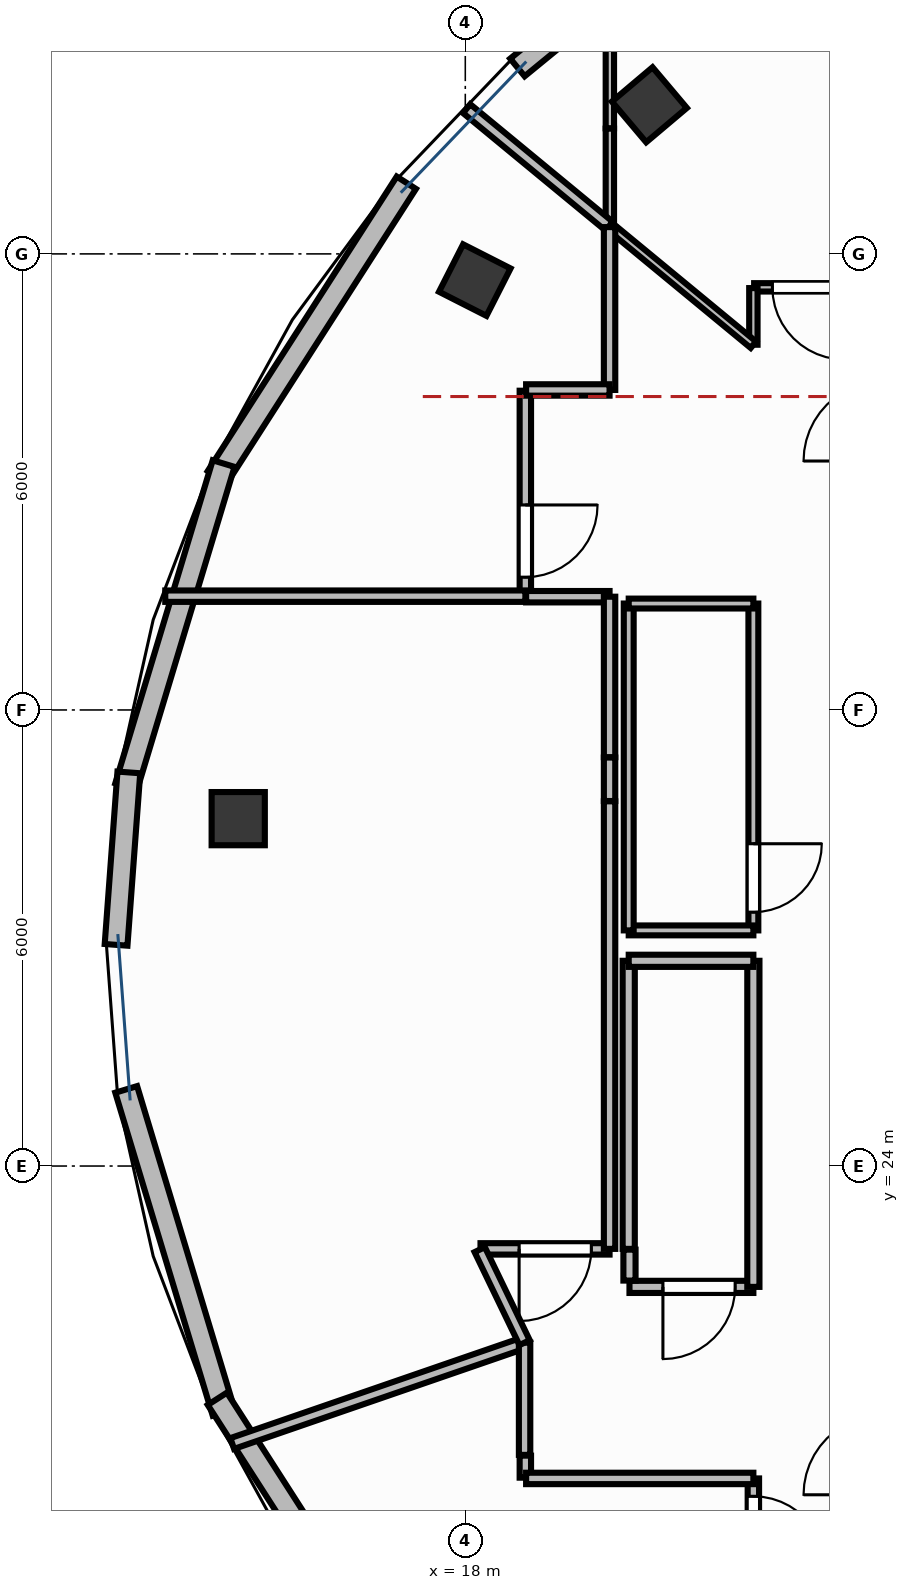
"""IFC4 building model, lengths in metres.
Left out: names, types, materials, properties, quantities, classifications, styles, units other than length and angle.
Written with IfcOpenShell. Run it as: python <this file> out.ifc"""

import sys

from ifc_helpers import new_model, si_unit, direction, frame, frame_2d, origin, origin_2d, place, context, subcontext, project, spatial, rectangle, extrude, element, fill, save


model = new_model("IFC4")
c1 = context("Model", 3, precision=1e-05, world=origin(), true_north=direction((0.0, 1.0)))
c2 = subcontext(c1, "Body", "Model", "MODEL_VIEW")
j1 = project(units=[si_unit("LENGTHUNIT", "METRE"), si_unit("PLANEANGLEUNIT", "RADIAN")], contexts=[c1])
p1 = place(None, origin())
s1 = spatial("IfcSite", under=j1, at=p1, CompositionType="ELEMENT")
p2 = place(p1, origin())
s2 = spatial("IfcBuilding", under=s1, at=p2, CompositionType="ELEMENT")
p3 = place(p2, frame((0.0, 0.0, 322.8)))
s3 = spatial("IfcBuildingStorey", under=s2, at=p3, CompositionType="ELEMENT", Elevation=322.8)
for number, where, z_axis, x_axis in (
    (1, (20.422, 37.962, -0.0), (0.0, 0.0, 1.0), (0.764, 0.645, 0.0)),
    (2, (18.125, 35.655, -0.0), (0.0, 0.0, 1.0), (0.453, 0.891, 0.0)),
    (3, (15.013, 28.57, -0.0), (0.0, 0.0, 1.0), (0.0, 1.0, 0.0)),
):
    element("IfcColumn", number, at=place(p3, frame(where, z_axis=z_axis, x_axis=x_axis)), inside=s3, PredefinedType="COLUMN", context=c2, shape_type="SweptSolid", body=[
        extrude(rectangle(XDim=0.7, YDim=0.7, at=origin_2d()), origin(), (0.0, 0.0, 1.0), 3.901),
    ])
p4 = place(p3, frame((20.64, 40.054, 0.0), z_axis=(0.0, 0.0, 1.0), x_axis=(-0.77351792086, -0.633774428411, 0.0)))
e4 = element("IfcWall", 4, at=p4, inside=s3, PredefinedType="STANDARD", context=c2, shape_type="SweptSolid", body=[
    extrude(rectangle(XDim=2.526, YDim=0.3, at=frame_2d((1.263, 0.0))), origin(), (0.0, 0.0, 1.0), 3.9),
])
p5 = place(p3, frame((17.224, 36.936, 0.0), z_axis=(0.0, 0.0, 1.0), x_axis=(-0.540087262842, -0.841609023547, 0.0)))
e5 = element("IfcWall", 5, at=p5, inside=s3, PredefinedType="STANDARD", context=c2, shape_type="SweptSolid", body=[
    extrude(rectangle(XDim=4.603, YDim=0.3, at=frame_2d((2.302, 0.0))), origin(), (0.0, 0.0, 1.0), 3.9),
])
p6 = place(p3, frame((14.821, 33.241, 0.0), z_axis=(0.0, 0.0, 1.0), x_axis=(-0.288720187326, -0.95741352269, 0.0)))
e6 = element("IfcWall", 6, at=p6, inside=s3, PredefinedType="STANDARD", context=c2, shape_type="SweptSolid", body=[
    extrude(rectangle(XDim=4.438, YDim=0.3, at=frame_2d((2.219, 0.0))), origin(), (0.0, 0.0, 1.0), 3.9),
])
p7 = place(p3, frame((13.573, 29.178, 0.0), z_axis=(0.0, 0.0, 1.0), x_axis=(-0.073741209899, -0.997277410735, 0.0)))
e7 = element("IfcWall", 7, at=p7, inside=s3, PredefinedType="STANDARD", context=c2, shape_type="SweptSolid", body=[
    extrude(rectangle(XDim=2.274, YDim=0.3, at=frame_2d((1.137, 0.0))), origin(), (0.0, 0.0, 1.0), 3.9),
])
p8 = place(p3, frame((13.539, 25.008, 0.0), z_axis=(0.0, 0.0, 1.0), x_axis=(0.288720187326, -0.95741352269, 0.0)))
e8 = element("IfcWall", 8, at=p8, inside=s3, PredefinedType="STANDARD", context=c2, shape_type="SweptSolid", body=[
    extrude(rectangle(XDim=4.438, YDim=0.3, at=frame_2d((2.219, 0.0))), origin(), (0.0, 0.0, 1.0), 3.9),
])
p9 = place(p3, frame((14.738, 20.938, 0.0), z_axis=(0.0, 0.0, 1.0), x_axis=(0.540087262842, -0.841609023547, 0.0)))
e9 = element("IfcWall", 9, at=p9, inside=s3, PredefinedType="STANDARD", context=c2, shape_type="SweptSolid", body=[
    extrude(rectangle(XDim=4.603, YDim=0.3, at=frame_2d((2.302, 0.0))), origin(), (0.0, 0.0, 1.0), 3.9),
])
p10 = place(p3, frame((21.79, 22.41, 0.0), z_axis=(0.0, 0.0, 1.0), x_axis=(-1.0, 0.0, 0.0)))
e10 = element("IfcWall", 10, at=p10, inside=s3, PredefinedType="PARTITIONING", context=c2, shape_type="SweptSolid", body=[
    extrude(rectangle(XDim=1.63, YDim=0.16, at=frame_2d((0.815, 0.0))), origin(), (0.0, 0.0, 1.0), 2.22),
])
p11 = place(p10, frame((0.24, 0.0, 0.0)))
e11 = element("IfcOpeningElement", 11, at=p11, cuts=e10, PredefinedType="OPENING", context=c2, shape_type="SweptSolid", body=[
    extrude(rectangle(XDim=0.95, YDim=2.15, at=frame_2d((0.475, 1.075))), frame((0.0, 0.095, 0.0), z_axis=(0.0, -1.0, 0.0), x_axis=(1.0, 0.0, 0.0)), (0.0, 0.0, 1.0), 0.19),
])
p12 = place(p3, frame((21.79, 31.4, 0.0), z_axis=(0.0, 0.0, 1.0), x_axis=(0.0, -1.0, 0.0)))
e12 = element("IfcWall", 12, at=p12, inside=s3, PredefinedType="PARTITIONING", context=c2, shape_type="SweptSolid", body=[
    extrude(rectangle(XDim=4.3, YDim=0.13, at=frame_2d((2.15, 0.0))), origin(), (0.0, 0.0, 1.0), 2.22),
])
p13 = place(p12, frame((3.16, 0.0, 0.0)))
e13 = element("IfcOpeningElement", 13, at=p13, cuts=e12, PredefinedType="OPENING", context=c2, shape_type="SweptSolid", body=[
    extrude(rectangle(XDim=0.9, YDim=2.15, at=frame_2d((0.45, 1.075))), frame((0.0, 0.08, 0.0), z_axis=(0.0, -1.0, 0.0), x_axis=(1.0, 0.0, 0.0)), (0.0, 0.0, 1.0), 0.16),
])
p14 = place(p3, frame((21.79, 19.89, 0.0), z_axis=(0.0, 0.0, 1.0), x_axis=(0.0, -1.0, 0.0)))
e14 = element("IfcWall", 14, at=p14, inside=s3, PredefinedType="PARTITIONING", context=c2, shape_type="SweptSolid", body=[
    extrude(rectangle(XDim=1.44, YDim=0.15, at=frame_2d((0.72, 0.0))), origin(), (0.0, 0.0, 1.0), 2.22),
])
p15 = place(p14, frame((0.235, 0.0, 0.0)))
e15 = element("IfcOpeningElement", 15, at=p15, cuts=e14, PredefinedType="OPENING", context=c2, shape_type="SweptSolid", body=[
    extrude(rectangle(XDim=0.95, YDim=2.15, at=frame_2d((0.475, 1.075))), frame((0.0, 0.09, 0.0), z_axis=(0.0, -1.0, 0.0), x_axis=(1.0, 0.0, 0.0)), (0.0, 0.0, 1.0), 0.18),
])
p16 = place(p3, frame((23.49, 35.56, 0.0), z_axis=(0.0, 0.0, 1.0), x_axis=(-1.0, 0.0, 0.0)))
e16 = element("IfcWall", 16, at=p16, inside=s3, PredefinedType="MOVABLE", context=c2, shape_type="SweptSolid", body=[
    extrude(rectangle(XDim=1.69, YDim=0.11, at=frame_2d((0.845, 0.0))), origin(), (0.0, 0.0, 1.0), 2.22),
])
p17 = place(p16, frame((0.5, 0.0, 0.0)))
e17 = element("IfcOpeningElement", 17, at=p17, cuts=e16, PredefinedType="OPENING", context=c2, shape_type="SweptSolid", body=[
    extrude(rectangle(XDim=0.95, YDim=2.15, at=frame_2d((0.475, 1.075))), frame((0.0, 0.07, 0.0), z_axis=(0.0, -1.0, 0.0), x_axis=(1.0, 0.0, 0.0)), (0.0, 0.0, 1.0), 0.14),
])
p18 = place(p3, frame((19.898, 22.91, 0.0), z_axis=(0.0, 0.0, 1.0), x_axis=(-1.0, 0.0, 0.0)))
e18 = element("IfcWall", 18, at=p18, inside=s3, PredefinedType="PARTITIONING", context=c2, shape_type="SweptSolid", body=[
    extrude(rectangle(XDim=1.698, YDim=0.15, at=frame_2d((0.849, 0.0))), origin(), (0.0, 0.0, 1.0), 2.22),
])
p19 = place(p18, frame((0.24, 0.0, 0.0)))
e19 = element("IfcOpeningElement", 19, at=p19, cuts=e18, PredefinedType="OPENING", context=c2, shape_type="SweptSolid", body=[
    extrude(rectangle(XDim=0.95, YDim=2.15, at=frame_2d((0.475, 1.075))), frame((0.0, 0.09, 0.0), z_axis=(0.0, -1.0, 0.0), x_axis=(1.0, 0.0, 0.0)), (0.0, 0.0, 1.0), 0.18),
])
p20 = place(p3, frame((18.79, 34.2, 0.0), z_axis=(0.0, 0.0, 1.0), x_axis=(0.0, -1.0, 0.0)))
e20 = element("IfcWall", 20, at=p20, inside=s3, PredefinedType="PARTITIONING", context=c2, shape_type="SweptSolid", body=[
    extrude(rectangle(XDim=2.693, YDim=0.15, at=frame_2d((1.346, 0.0))), origin(), (0.0, 0.0, 1.0), 2.22),
])
p21 = place(p20, frame((1.503, 0.0, 0.0)))
e21 = element("IfcOpeningElement", 21, at=p21, cuts=e20, PredefinedType="OPENING", context=c2, shape_type="SweptSolid", body=[
    extrude(rectangle(XDim=0.95, YDim=2.15, at=frame_2d((0.475, 1.075))), frame((0.0, 0.09, 0.0), z_axis=(0.0, -1.0, 0.0), x_axis=(1.0, 0.0, 0.0)), (0.0, 0.0, 1.0), 0.18),
])
p22 = place(p3, frame((21.79, 26.7, 0.0), z_axis=(0.0, 0.0, 1.0), x_axis=(0.0, -1.0, 0.0)))
e22 = element("IfcWall", 22, at=p22, inside=s3, PredefinedType="PARTITIONING", context=c2, shape_type="SweptSolid", body=[
    extrude(rectangle(XDim=4.29, YDim=0.16, at=frame_2d((2.145, 0.0))), origin(), (0.0, 0.0, 1.0), 2.22),
])
p23 = place(p3, frame((20.16, 22.493, 0.0), z_axis=(0.0, 0.0, 1.0), x_axis=(0.0, 1.0, 0.0)))
e23 = element("IfcWall", 23, at=p23, inside=s3, PredefinedType="PARTITIONING", context=c2, shape_type="SweptSolid", body=[
    extrude(rectangle(XDim=0.407, YDim=0.16, at=frame_2d((0.204, 0.0))), origin(), (0.0, 0.0, 1.0), 2.22),
])
p24 = place(p3, frame((20.15, 22.91, 0.0), z_axis=(0.0, 0.0, 1.0), x_axis=(0.0, 1.0, 0.0)))
e24 = element("IfcWall", 24, at=p24, inside=s3, PredefinedType="PARTITIONING", context=c2, shape_type="SweptSolid", body=[
    extrude(rectangle(XDim=3.79, YDim=0.16, at=frame_2d((1.895, 0.0))), origin(), (0.0, 0.0, 1.0), 2.22),
])
p25 = place(p3, frame((20.15, 26.7, 0.0), z_axis=(0.0, 0.0, 1.0), x_axis=(1.0, 0.0, 0.0)))
e25 = element("IfcWall", 25, at=p25, inside=s3, PredefinedType="PARTITIONING", context=c2, shape_type="SweptSolid", body=[
    extrude(rectangle(XDim=1.64, YDim=0.16, at=frame_2d((0.82, 0.0))), origin(), (0.0, 0.0, 1.0), 2.22),
])
p26 = place(p3, frame((21.79, 27.1, 0.0), z_axis=(0.0, 0.0, 1.0), x_axis=(-1.0, 0.0, 0.0)))
e26 = element("IfcWall", 26, at=p26, inside=s3, PredefinedType="PARTITIONING", context=c2, shape_type="SweptSolid", body=[
    extrude(rectangle(XDim=1.64, YDim=0.13, at=frame_2d((0.82, 0.0))), origin(), (0.0, 0.0, 1.0), 2.22),
])
p27 = place(p3, frame((20.15, 27.1, 0.0), z_axis=(0.0, 0.0, 1.0), x_axis=(0.0, 1.0, 0.0)))
e27 = element("IfcWall", 27, at=p27, inside=s3, PredefinedType="PARTITIONING", context=c2, shape_type="SweptSolid", body=[
    extrude(rectangle(XDim=4.3, YDim=0.13, at=frame_2d((2.15, 0.0))), origin(), (0.0, 0.0, 1.0), 2.22),
])
p28 = place(p3, frame((20.15, 31.4, 0.0), z_axis=(0.0, 0.0, 1.0), x_axis=(1.0, 0.0, 0.0)))
e28 = element("IfcWall", 28, at=p28, inside=s3, PredefinedType="PARTITIONING", context=c2, shape_type="SweptSolid", body=[
    extrude(rectangle(XDim=1.64, YDim=0.13, at=frame_2d((0.82, 0.0))), origin(), (0.0, 0.0, 1.0), 2.22),
])
p29 = place(p3, frame((14.934, 20.35, 0.0), z_axis=(0.0, 0.0, 1.0), x_axis=(0.945331527332, 0.326110875979, 0.0)))
e29 = element("IfcWall", 29, at=p29, inside=s3, PredefinedType="PARTITIONING", context=c2, shape_type="SweptSolid", body=[
    extrude(rectangle(XDim=4.069, YDim=0.15, at=frame_2d((2.034, 0.0))), origin(), (0.0, 0.0, 1.0), 2.22),
])
p30 = place(p3, frame((18.78, 21.677, 0.0), z_axis=(0.0, 0.0, 1.0), x_axis=(0.0, -1.0, 0.0)))
e30 = element("IfcWall", 30, at=p30, inside=s3, PredefinedType="PARTITIONING", context=c2, shape_type="SweptSolid", body=[
    extrude(rectangle(XDim=1.477, YDim=0.15, at=frame_2d((0.738, 0.0))), origin(), (0.0, 0.0, 1.0), 2.22),
])
p31 = place(p3, frame((18.79, 20.19, 0.0), z_axis=(0.0, 0.0, 1.0), x_axis=(0.0, -1.0, 0.0)))
e31 = element("IfcWall", 31, at=p31, inside=s3, PredefinedType="PARTITIONING", context=c2, shape_type="SweptSolid", body=[
    extrude(rectangle(XDim=0.29, YDim=0.15, at=frame_2d((0.145, 0.0))), origin(), (0.0, 0.0, 1.0), 2.22),
])
p32 = place(p3, frame((18.8, 19.89, 0.0), z_axis=(0.0, 0.0, 1.0), x_axis=(1.0, 0.0, 0.0)))
e32 = element("IfcWall", 32, at=p32, inside=s3, PredefinedType="PARTITIONING", context=c2, shape_type="SweptSolid", body=[
    extrude(rectangle(XDim=2.99, YDim=0.15, at=frame_2d((1.495, 0.0))), origin(), (0.0, 0.0, 1.0), 2.22),
])
p33 = place(p3, frame((19.902, 37.652, 0.0), z_axis=(0.0, 0.0, 1.0), x_axis=(0.0, 1.0, 0.0)))
e33 = element("IfcWall", 33, at=p33, inside=s3, PredefinedType="MOVABLE", context=c2, shape_type="SweptSolid", body=[
    extrude(rectangle(XDim=1.873, YDim=0.11, at=frame_2d((0.937, 0.0))), origin(), (0.0, 0.0, 1.0), 2.22),
])
p34 = place(p3, frame((21.79, 35.55, 0.0), z_axis=(0.0, 0.0, 1.0), x_axis=(0.0, -1.0, 0.0)))
e34 = element("IfcWall", 34, at=p34, inside=s3, PredefinedType="MOVABLE", context=c2, shape_type="SweptSolid", body=[
    extrude(rectangle(XDim=0.745, YDim=0.11, at=frame_2d((0.373, 0.0))), origin(), (0.0, 0.0, 1.0), 2.22),
])
p35 = place(p3, frame((21.79, 34.805, 0.0), z_axis=(0.0, 0.0, 1.0), x_axis=(-0.771457748332, 0.636280553325, 0.0)))
e35 = element("IfcWall", 35, at=p35, inside=s3, PredefinedType="MOVABLE", context=c2, shape_type="SweptSolid", body=[
    extrude(rectangle(XDim=2.447, YDim=0.11, at=frame_2d((1.224, 0.0))), origin(), (0.0, 0.0, 1.0), 2.22),
])
p36 = place(p3, frame((19.902, 36.362, 0.0), z_axis=(0.0, 0.0, 1.0), x_axis=(0.0, 1.0, 0.0)))
e36 = element("IfcWall", 36, at=p36, inside=s3, PredefinedType="MOVABLE", context=c2, shape_type="SweptSolid", body=[
    extrude(rectangle(XDim=1.285, YDim=0.11, at=frame_2d((0.643, 0.0))), origin(), (0.0, 0.0, 1.0), 2.22),
])
p37 = place(p3, frame((14.052, 31.497, 0.0), z_axis=(0.0, 0.0, 1.0), x_axis=(1.0, 0.0, 0.0)))
e37 = element("IfcWall", 37, at=p37, inside=s3, PredefinedType="PARTITIONING", context=c2, shape_type="SweptSolid", body=[
    extrude(rectangle(XDim=4.738, YDim=0.15, at=frame_2d((2.369, 0.0))), origin(), (0.0, 0.0, 1.0), 2.22),
])
p38 = place(p3, frame((18.8, 31.49, 0.0), z_axis=(0.0, 0.0, 1.0), x_axis=(1.0, 0.0, 0.0)))
e38 = element("IfcWall", 38, at=p38, inside=s3, PredefinedType="PARTITIONING", context=c2, shape_type="SweptSolid", body=[
    extrude(rectangle(XDim=1.098, YDim=0.15, at=frame_2d((0.549, 0.0))), origin(), (0.0, 0.0, 1.0), 2.22),
])
p39 = place(p3, frame((19.898, 31.49, 0.0), z_axis=(0.0, 0.0, 1.0), x_axis=(0.0, -1.0, 0.0)))
e39 = element("IfcWall", 39, at=p39, inside=s3, PredefinedType="PARTITIONING", context=c2, shape_type="SweptSolid", body=[
    extrude(rectangle(XDim=2.112, YDim=0.15, at=frame_2d((1.056, 0.0))), origin(), (0.0, 0.0, 1.0), 2.22),
])
p40 = place(p3, frame((19.898, 29.374, 0.0), z_axis=(0.0, 0.0, 1.0), x_axis=(0.0, -1.0, 0.0)))
e40 = element("IfcWall", 40, at=p40, inside=s3, PredefinedType="PARTITIONING", context=c2, shape_type="SweptSolid", body=[
    extrude(rectangle(XDim=0.572, YDim=0.15, at=frame_2d((0.286, 0.0))), origin(), (0.0, 0.0, 1.0), 2.22),
])
p41 = place(p3, frame((19.898, 28.798, 0.0), z_axis=(0.0, 0.0, 1.0), x_axis=(0.0, -1.0, 0.0)))
e41 = element("IfcWall", 41, at=p41, inside=s3, PredefinedType="PARTITIONING", context=c2, shape_type="SweptSolid", body=[
    extrude(rectangle(XDim=5.888, YDim=0.15, at=frame_2d((2.944, 0.0))), origin(), (0.0, 0.0, 1.0), 2.22),
])
p42 = place(p3, frame((18.19, 22.9, 0.0), z_axis=(0.0, 0.0, 1.0), x_axis=(0.434442417688, -0.900699609034, 0.0)))
e42 = element("IfcWall", 42, at=p42, inside=s3, PredefinedType="PARTITIONING", context=c2, shape_type="SweptSolid", body=[
    extrude(rectangle(XDim=1.358, YDim=0.15, at=frame_2d((0.679, 0.0))), origin(), (0.0, 0.0, 1.0), 2.22),
])
p43 = place(p3, frame((18.018, 37.911, 0.0), z_axis=(0.0, 0.0, 1.0), x_axis=(0.771439858468, -0.636302243251, 0.0)))
e43 = element("IfcWall", 43, at=p43, inside=s3, PredefinedType="PARTITIONING", context=c2, shape_type="SweptSolid", body=[
    extrude(rectangle(XDim=2.43, YDim=0.15, at=frame_2d((1.215, 0.0))), origin(), (0.0, 0.0, 1.0), 2.22),
])
p44 = place(p3, frame((19.898, 36.352, 0.0), z_axis=(0.0, 0.0, 1.0), x_axis=(0.0, -1.0, 0.0)))
e44 = element("IfcWall", 44, at=p44, inside=s3, PredefinedType="PARTITIONING", context=c2, shape_type="SweptSolid", body=[
    extrude(rectangle(XDim=2.142, YDim=0.15, at=frame_2d((1.071, 0.0))), origin(), (0.0, 0.0, 1.0), 2.22),
])
p45 = place(p3, frame((19.898, 34.21, 0.0), z_axis=(0.0, 0.0, 1.0), x_axis=(-1.0, 0.0, 0.0)))
e45 = element("IfcWall", 45, at=p45, inside=s3, PredefinedType="PARTITIONING", context=c2, shape_type="SweptSolid", body=[
    extrude(rectangle(XDim=1.098, YDim=0.15, at=frame_2d((0.549, 0.0))), origin(), (0.0, 0.0, 1.0), 2.22),
])
p46 = place(p11, origin())
e46 = element("IfcDoor", 46, at=p46, inside=s3, OperationType="SINGLE_SWING_RIGHT", PredefinedType="DOOR", context=c2, shape_type="SweptSolid", body=[
    extrude(rectangle(XDim=0.95, YDim=2.15, at=frame_2d((0.475, 1.075))), frame((0.0, 0.025, 0.0), z_axis=(0.0, -1.0, 0.0), x_axis=(1.0, 0.0, 0.0)), (0.0, 0.0, 1.0), 0.05),
])
fill(e11, e46)
p47 = place(p13, origin())
e47 = element("IfcDoor", 47, at=p47, inside=s3, OperationType="SINGLE_SWING_LEFT", PredefinedType="DOOR", context=c2, shape_type="SweptSolid", body=[
    extrude(rectangle(XDim=0.9, YDim=2.15, at=frame_2d((0.45, 1.075))), frame((0.0, 0.025, 0.0), z_axis=(0.0, -1.0, 0.0), x_axis=(1.0, 0.0, 0.0)), (0.0, 0.0, 1.0), 0.05),
])
fill(e13, e47)
p48 = place(p15, origin())
e48 = element("IfcDoor", 48, at=p48, inside=s3, OperationType="SINGLE_SWING_RIGHT", PredefinedType="DOOR", context=c2, shape_type="SweptSolid", body=[
    extrude(rectangle(XDim=0.95, YDim=2.15, at=frame_2d((0.475, 1.075))), frame((0.0, 0.025, 0.0), z_axis=(0.0, -1.0, 0.0), x_axis=(1.0, 0.0, 0.0)), (0.0, 0.0, 1.0), 0.05),
])
fill(e15, e48)
p49 = place(p17, origin())
e49 = element("IfcDoor", 49, at=p49, inside=s3, OperationType="SINGLE_SWING_LEFT", PredefinedType="DOOR", context=c2, shape_type="SweptSolid", body=[
    extrude(rectangle(XDim=0.95, YDim=2.15, at=frame_2d((0.475, 1.075))), frame((0.0, 0.025, 0.0), z_axis=(0.0, -1.0, 0.0), x_axis=(1.0, 0.0, 0.0)), (0.0, 0.0, 1.0), 0.05),
])
fill(e17, e49)
p50 = place(p19, origin())
e50 = element("IfcDoor", 50, at=p50, inside=s3, OperationType="SINGLE_SWING_RIGHT", PredefinedType="DOOR", context=c2, shape_type="SweptSolid", body=[
    extrude(rectangle(XDim=0.95, YDim=2.15, at=frame_2d((0.475, 1.075))), frame((0.0, 0.025, 0.0), z_axis=(0.0, -1.0, 0.0), x_axis=(1.0, 0.0, 0.0)), (0.0, 0.0, 1.0), 0.05),
])
fill(e19, e50)
p51 = place(p21, origin())
e51 = element("IfcDoor", 51, at=p51, inside=s3, OperationType="SINGLE_SWING_LEFT", PredefinedType="DOOR", context=c2, shape_type="SweptSolid", body=[
    extrude(rectangle(XDim=0.95, YDim=2.15, at=frame_2d((0.475, 1.075))), frame((0.0, 0.025, 0.0), z_axis=(0.0, -1.0, 0.0), x_axis=(1.0, 0.0, 0.0)), (0.0, 0.0, 1.0), 0.05),
])
fill(e21, e51)
save(model, sys.argv[1])
